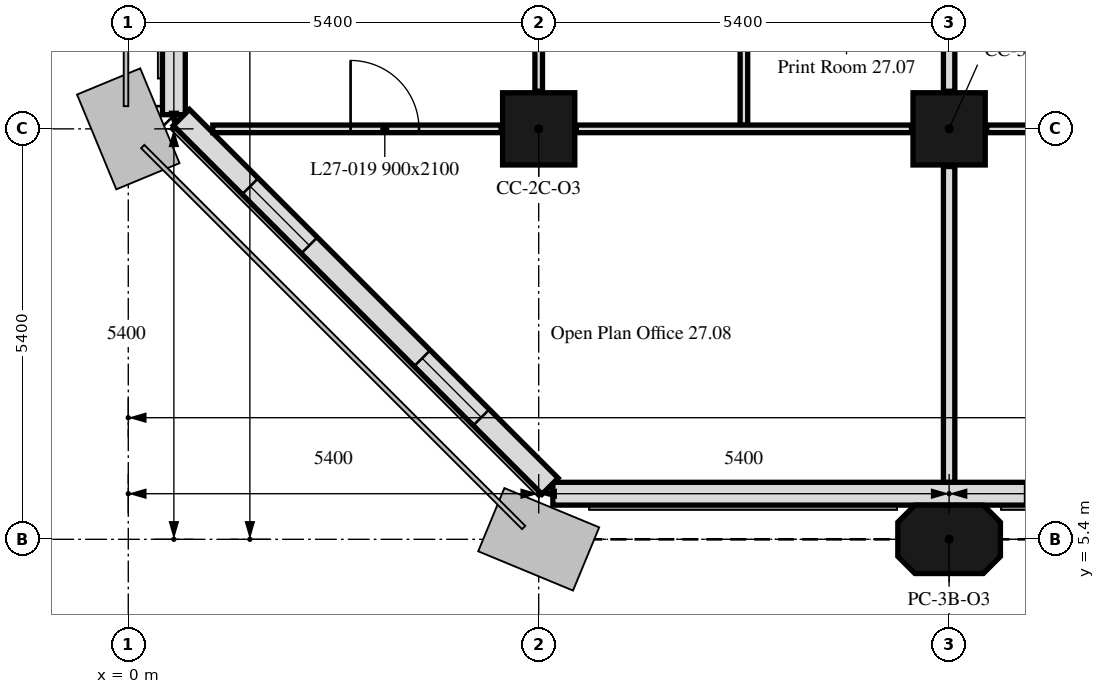
"""IFC4 building model, lengths in metres.
Left out: names, types, materials, properties, quantities, classifications, styles, units other than length and angle.
Written with IfcOpenShell. Run it as: python <this file> out.ifc"""

import sys

from ifc_helpers import new_model, si_unit, direction, frame, frame_2d, origin, origin_2d, place, context, subcontext, project, spatial, polyline, rectangle, outline, extrude, element, fill, save


model = new_model("IFC4")
c1 = context("Model", 3, precision=1e-05, world=origin(), true_north=direction((0.0, 1.0)))
c2 = subcontext(c1, "Body", "Model", "MODEL_VIEW")
j1 = project(units=[si_unit("LENGTHUNIT", "METRE"), si_unit("PLANEANGLEUNIT", "RADIAN")], contexts=[c1])
p1 = place(None, origin())
s1 = spatial("IfcSite", under=j1, at=p1, CompositionType="ELEMENT")
p2 = place(p1, origin())
s2 = spatial("IfcBuilding", under=s1, at=p2, CompositionType="ELEMENT")
p3 = place(p2, frame((0.0, 0.0, 114.4)))
s3 = spatial("IfcBuildingStorey", under=s2, at=p3, CompositionType="ELEMENT", Elevation=114.4)
p4 = place(p3, frame((10.8, 5.4, 0.0), z_axis=(0.0, 0.0, 1.0), x_axis=(1.0, 0.0, 0.0)))
e1 = element("IfcColumn", 1, at=p4, inside=s3, PredefinedType="COLUMN", context=c2, shape_type="SweptSolid", body=[
    extrude(outline(polyline([(-0.45, -0.45), (0.45, -0.45), (0.675, -0.225), (0.675, 0.225), (0.45, 0.45), (-0.45, 0.45), (-0.675, 0.225), (-0.675, -0.225), (-0.45, -0.45)])), origin(), (0.0, 0.0, 1.0), 3.5),
])
for number, where, z_axis, x_axis in (
    (2, (5.4, 10.8, 0.0), (0.0, 0.0, 1.0), (1.0, 0.0, 0.0)),
    (3, (10.8, 10.8, 0.0), (0.0, 0.0, 1.0), (1.0, 0.0, 0.0)),
):
    element("IfcColumn", number, at=place(p3, frame(where, z_axis=z_axis, x_axis=x_axis)), inside=s3, PredefinedType="COLUMN", context=c2, shape_type="SweptSolid", body=[
        extrude(rectangle(XDim=0.95, YDim=0.95, at=origin_2d()), origin(), (0.0, 0.0, 1.0), 3.5),
    ])
p5 = place(p3, frame((5.586, 6.0, 0.0), z_axis=(0.0, 0.0, 1.0), x_axis=(1.0, 0.0, 0.0)))
e4 = element("IfcWall", 4, at=p5, inside=s3, PredefinedType="SOLIDWALL", context=c2, shape_type="SweptSolid", body=[
    extrude(rectangle(XDim=32.027, YDim=0.3, at=frame_2d((16.014, 0.0))), origin(), (0.0, 0.0, 1.0), 3.5),
])
p6 = place(p5, frame((6.214, 0.0, 0.9)))
e5 = element("IfcOpeningElement", 5, at=p6, cuts=e4, PredefinedType="OPENING", context=c2, shape_type="SweptSolid", body=[
    extrude(rectangle(XDim=3.4, YDim=1.7, at=frame_2d((1.7, 0.85))), frame((0.0, 0.16, 0.0), z_axis=(0.0, -1.0, 0.0), x_axis=(1.0, 0.0, 0.0)), (0.0, 0.0, 1.0), 0.32),
])
p7 = place(p5, frame((17.014, 0.0, 0.9)))
e6 = element("IfcOpeningElement", 6, at=p7, cuts=e4, PredefinedType="OPENING", context=c2, shape_type="SweptSolid", body=[
    extrude(rectangle(XDim=3.4, YDim=1.7, at=frame_2d((1.7, 0.85))), frame((0.0, 0.16, 0.0), z_axis=(0.0, -1.0, 0.0), x_axis=(1.0, 0.0, 0.0)), (0.0, 0.0, 1.0), 0.32),
])
p8 = place(p5, frame((27.814, 0.0, 0.9)))
e7 = element("IfcOpeningElement", 7, at=p8, cuts=e4, PredefinedType="OPENING", context=c2, shape_type="SweptSolid", body=[
    extrude(rectangle(XDim=3.4, YDim=1.7, at=frame_2d((1.7, 0.85))), frame((0.0, 0.16, 0.0), z_axis=(0.0, -1.0, 0.0), x_axis=(1.0, 0.0, 0.0)), (0.0, 0.0, 1.0), 0.32),
])
p9 = place(p3, frame((0.6, 43.014, 0.0), z_axis=(0.0, 0.0, 1.0), x_axis=(0.0, -1.0, 0.0)))
e8 = element("IfcWall", 8, at=p9, inside=s3, PredefinedType="SOLIDWALL", context=c2, shape_type="SweptSolid", body=[
    extrude(rectangle(XDim=32.027, YDim=0.3, at=frame_2d((16.014, 0.0))), origin(), (0.0, 0.0, 1.0), 3.5),
])
p10 = place(p9, frame((6.564, 0.0, 0.9)))
e9 = element("IfcOpeningElement", 9, at=p10, cuts=e8, PredefinedType="OPENING", context=c2, shape_type="SweptSolid", body=[
    extrude(rectangle(XDim=1.1, YDim=1.7, at=frame_2d((0.55, 0.85))), frame((0.0, 0.16, 0.0), z_axis=(0.0, -1.0, 0.0), x_axis=(1.0, 0.0, 0.0)), (0.0, 0.0, 1.0), 0.32),
])
p11 = place(p9, frame((8.164, 0.0, 0.9)))
e10 = element("IfcOpeningElement", 10, at=p11, cuts=e8, PredefinedType="OPENING", context=c2, shape_type="SweptSolid", body=[
    extrude(rectangle(XDim=1.1, YDim=1.7, at=frame_2d((0.55, 0.85))), frame((0.0, 0.16, 0.0), z_axis=(0.0, -1.0, 0.0), x_axis=(1.0, 0.0, 0.0)), (0.0, 0.0, 1.0), 0.32),
])
p12 = place(p9, frame((17.014, 0.0, 0.9)))
e11 = element("IfcOpeningElement", 11, at=p12, cuts=e8, PredefinedType="OPENING", context=c2, shape_type="SweptSolid", body=[
    extrude(rectangle(XDim=3.4, YDim=1.7, at=frame_2d((1.7, 0.85))), frame((0.0, 0.16, 0.0), z_axis=(0.0, -1.0, 0.0), x_axis=(1.0, 0.0, 0.0)), (0.0, 0.0, 1.0), 0.32),
])
p13 = place(p9, frame((28.164, 0.0, 0.9)))
e12 = element("IfcOpeningElement", 12, at=p13, cuts=e8, PredefinedType="OPENING", context=c2, shape_type="SweptSolid", body=[
    extrude(rectangle(XDim=1.1, YDim=1.7, at=frame_2d((0.55, 0.85))), frame((0.0, 0.16, 0.0), z_axis=(0.0, -1.0, 0.0), x_axis=(1.0, 0.0, 0.0)), (0.0, 0.0, 1.0), 0.32),
])
p14 = place(p9, frame((29.764, 0.0, 0.9)))
e13 = element("IfcOpeningElement", 13, at=p14, cuts=e8, PredefinedType="OPENING", context=c2, shape_type="SweptSolid", body=[
    extrude(rectangle(XDim=1.1, YDim=1.7, at=frame_2d((0.55, 0.85))), frame((0.0, 0.16, 0.0), z_axis=(0.0, -1.0, 0.0), x_axis=(1.0, 0.0, 0.0)), (0.0, 0.0, 1.0), 0.32),
])
p15 = place(p3, frame((0.699, 10.949, 0.0), z_axis=(0.0, 0.0, 1.0), x_axis=(0.707106781187, -0.707106781187, 0.0)))
e14 = element("IfcWall", 14, at=p15, inside=s3, PredefinedType="SOLIDWALL", context=c2, shape_type="SweptSolid", body=[
    extrude(rectangle(XDim=6.86, YDim=0.3, at=frame_2d((3.43, 0.0))), origin(), (0.0, 0.0, 1.0), 3.5),
])
p16 = place(p15, frame((1.28, 0.0, 0.9)))
e15 = element("IfcOpeningElement", 15, at=p16, cuts=e14, PredefinedType="OPENING", context=c2, shape_type="SweptSolid", body=[
    extrude(rectangle(XDim=1.1, YDim=1.7, at=frame_2d((0.55, 0.85))), frame((0.0, 0.16, 0.0), z_axis=(0.0, -1.0, 0.0), x_axis=(1.0, 0.0, 0.0)), (0.0, 0.0, 1.0), 0.32),
])
p17 = place(p15, frame((4.48, 0.0, 0.9)))
e16 = element("IfcOpeningElement", 16, at=p17, cuts=e14, PredefinedType="OPENING", context=c2, shape_type="SweptSolid", body=[
    extrude(rectangle(XDim=1.1, YDim=1.7, at=frame_2d((0.55, 0.85))), frame((0.0, 0.16, 0.0), z_axis=(0.0, -1.0, 0.0), x_axis=(1.0, 0.0, 0.0)), (0.0, 0.0, 1.0), 0.32),
])
p18 = place(p3, frame((1.112, 10.8, 0.0), z_axis=(0.0, 0.0, 1.0), x_axis=(1.0, 0.0, 0.0)))
e17 = element("IfcWall", 17, at=p18, inside=s3, PredefinedType="PARTITIONING", context=c2, shape_type="SweptSolid", body=[
    extrude(rectangle(XDim=3.793, YDim=0.1, at=frame_2d((1.896, 0.0))), origin(), (0.0, 0.0, 1.0), 3.5),
])
p19 = place(p18, frame((1.813, 0.0, 0.0)))
e18 = element("IfcOpeningElement", 18, at=p19, cuts=e17, PredefinedType="OPENING", context=c2, shape_type="SweptSolid", body=[
    extrude(rectangle(XDim=0.9, YDim=2.1, at=frame_2d((0.45, 1.05))), frame((0.0, 0.05, 0.0), z_axis=(0.0, -1.0, 0.0), x_axis=(1.0, 0.0, 0.0)), (0.0, 0.0, 1.0), 0.1),
])
p20 = place(p3, frame((5.4, 11.295, 0.0), z_axis=(0.0, 0.0, 1.0), x_axis=(0.0, 1.0, 0.0)))
e19 = element("IfcWall", 19, at=p20, inside=s3, PredefinedType="PARTITIONING", context=c2, shape_type="SweptSolid", body=[
    extrude(rectangle(XDim=2.13, YDim=0.1, at=frame_2d((1.065, 0.0))), origin(), (0.0, 0.0, 1.0), 3.5),
])
p21 = place(p3, frame((8.1, 10.85, 0.0), z_axis=(0.0, 0.0, 1.0), x_axis=(0.0, 1.0, 0.0)))
e20 = element("IfcWall", 20, at=p21, inside=s3, PredefinedType="PARTITIONING", context=c2, shape_type="SweptSolid", body=[
    extrude(rectangle(XDim=2.575, YDim=0.1, at=frame_2d((1.288, 0.0))), origin(), (0.0, 0.0, 1.0), 3.5),
])
p22 = place(p3, frame((5.895, 10.8, 0.0), z_axis=(0.0, 0.0, 1.0), x_axis=(1.0, 0.0, 0.0)))
e21 = element("IfcWall", 21, at=p22, inside=s3, PredefinedType="PARTITIONING", context=c2, shape_type="SweptSolid", body=[
    extrude(rectangle(XDim=4.41, YDim=0.1, at=frame_2d((2.205, 0.0))), origin(), (0.0, 0.0, 1.0), 3.5),
])
p23 = place(p3, frame((10.8, 11.295, 0.0), z_axis=(0.0, 0.0, 1.0), x_axis=(0.0, 1.0, 0.0)))
e22 = element("IfcWall", 22, at=p23, inside=s3, PredefinedType="PARTITIONING", context=c2, shape_type="SweptSolid", body=[
    extrude(rectangle(XDim=2.13, YDim=0.15, at=frame_2d((1.065, 0.0))), origin(), (0.0, 0.0, 1.0), 3.5),
])
p24 = place(p3, frame((10.8, 6.151, 0.0), z_axis=(0.0, 0.0, 1.0), x_axis=(0.0, 1.0, 0.0)))
e23 = element("IfcWall", 23, at=p24, inside=s3, PredefinedType="PARTITIONING", context=c2, shape_type="SweptSolid", body=[
    extrude(rectangle(XDim=4.154, YDim=0.15, at=frame_2d((2.077, 0.0))), origin(), (0.0, 0.0, 1.0), 3.5),
])
p25 = place(p3, frame((11.295, 10.8, 0.0), z_axis=(0.0, 0.0, 1.0), x_axis=(1.0, 0.0, 0.0)))
e24 = element("IfcWall", 24, at=p25, inside=s3, PredefinedType="PARTITIONING", context=c2, shape_type="SweptSolid", body=[
    extrude(rectangle(XDim=4.41, YDim=0.1, at=frame_2d((2.205, 0.0))), origin(), (0.0, 0.0, 1.0), 3.5),
])
p26 = place(p25, frame((2.375, 0.0, 0.0)))
e25 = element("IfcOpeningElement", 25, at=p26, cuts=e24, PredefinedType="OPENING", context=c2, shape_type="SweptSolid", body=[
    extrude(rectangle(XDim=0.9, YDim=2.1, at=frame_2d((0.45, 1.05))), frame((0.0, 0.05, 0.0), z_axis=(0.0, -1.0, 0.0), x_axis=(1.0, 0.0, 0.0)), (0.0, 0.0, 1.0), 0.1),
])
p27 = place(p16, origin())
e26 = element("IfcWindow", 26, at=p27, inside=s3, PartitioningType="SINGLE_PANEL", PredefinedType="WINDOW", context=c2, shape_type="SweptSolid", body=[
    extrude(rectangle(XDim=1.1, YDim=1.7, at=frame_2d((0.55, 0.85))), frame((0.0, 0.03, 0.0), z_axis=(0.0, -1.0, 0.0), x_axis=(1.0, 0.0, 0.0)), (0.0, 0.0, 1.0), 0.06),
])
fill(e15, e26)
p28 = place(p17, origin())
e27 = element("IfcWindow", 27, at=p28, inside=s3, PartitioningType="SINGLE_PANEL", PredefinedType="WINDOW", context=c2, shape_type="SweptSolid", body=[
    extrude(rectangle(XDim=1.1, YDim=1.7, at=frame_2d((0.55, 0.85))), frame((0.0, 0.03, 0.0), z_axis=(0.0, -1.0, 0.0), x_axis=(1.0, 0.0, 0.0)), (0.0, 0.0, 1.0), 0.06),
])
fill(e16, e27)
p29 = place(p19, origin())
e28 = element("IfcDoor", 28, at=p29, inside=s3, OperationType="SINGLE_SWING_RIGHT", PredefinedType="DOOR", context=c2, shape_type="SweptSolid", body=[
    extrude(rectangle(XDim=0.9, YDim=2.1, at=frame_2d((0.45, 1.05))), frame((0.0, 0.025, 0.0), z_axis=(0.0, -1.0, 0.0), x_axis=(1.0, 0.0, 0.0)), (0.0, 0.0, 1.0), 0.05),
])
fill(e18, e28)
save(model, sys.argv[1])
